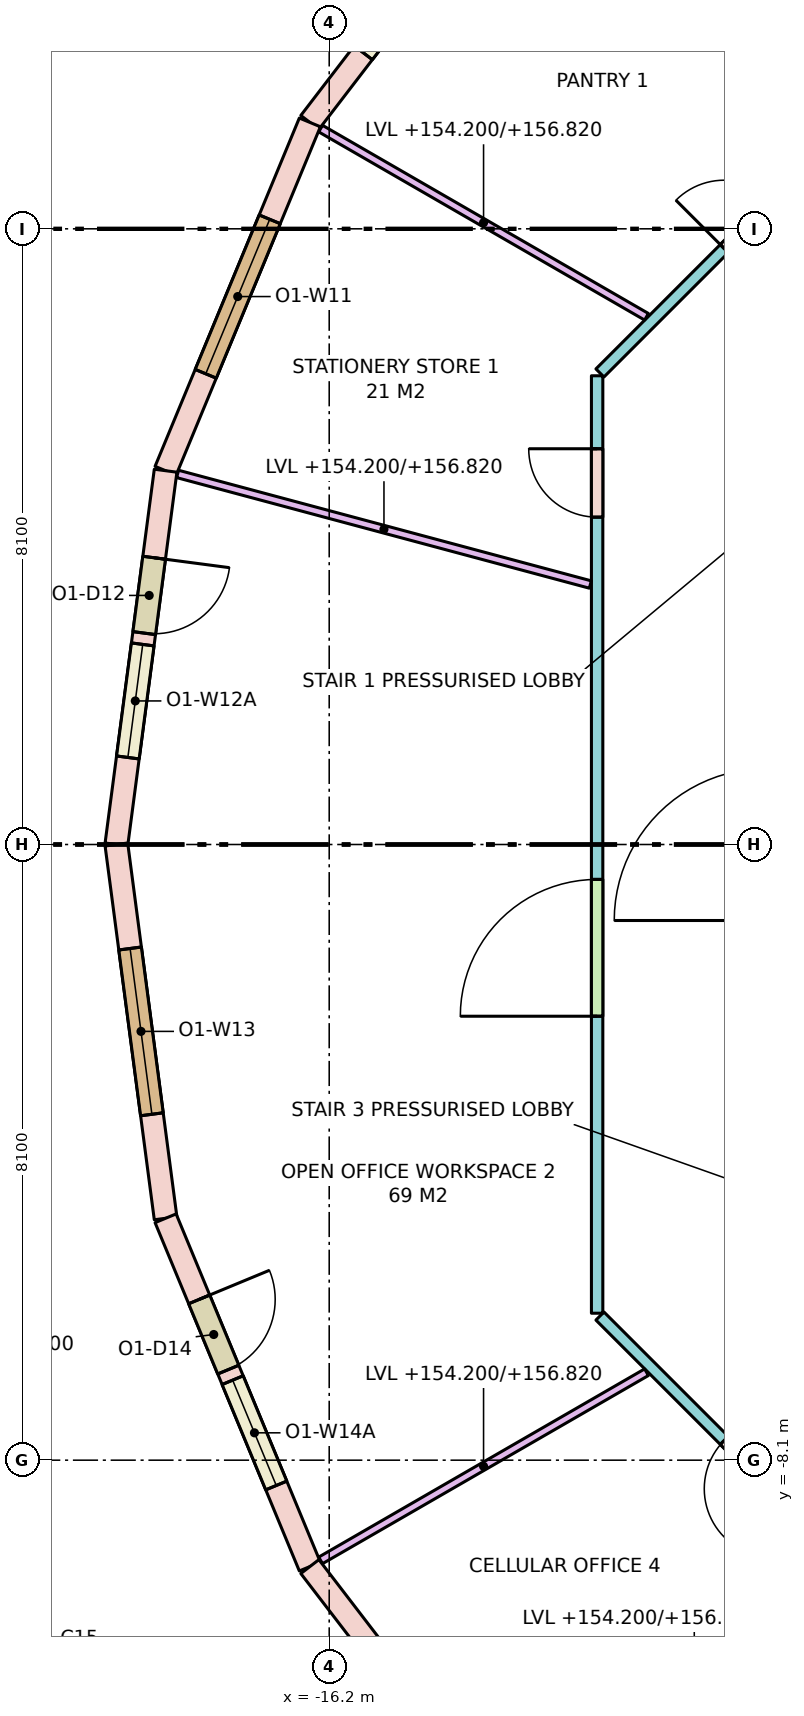
"""IFC4 building model, lengths in metres.
Left out: names, types, materials, properties, quantities, classifications, styles, units other than length and angle.
Written with IfcOpenShell. Run it as: python <this file> out.ifc"""

import sys

from ifc_helpers import new_model, si_unit, direction, frame, frame_2d, origin, place, context, subcontext, project, spatial, rectangle, extrude, element, fill, save


model = new_model("IFC4")
c1 = context("Model", 3, precision=1e-05, world=origin(), true_north=direction((0.0, 1.0)))
c2 = subcontext(c1, "Body", "Model", "MODEL_VIEW")
j1 = project(units=[si_unit("LENGTHUNIT", "METRE"), si_unit("PLANEANGLEUNIT", "RADIAN")], contexts=[c1])
p1 = place(None, origin())
s1 = spatial("IfcSite", under=j1, at=p1, CompositionType="ELEMENT")
p2 = place(p1, origin())
s2 = spatial("IfcBuilding", under=s1, at=p2, CompositionType="ELEMENT")
p3 = place(p2, frame((0.0, 0.0, 154.2)))
s3 = spatial("IfcBuildingStorey", under=s2, at=p3, CompositionType="ELEMENT", Elevation=154.2)
p4 = place(p3, frame((-13.435, 13.435, 0.0), z_axis=(0.0, 0.0, 1.0), x_axis=(-0.608768356425, -0.793348024649, 0.0)))
e1 = element("IfcWall", 1, at=p4, inside=s3, PredefinedType="STANDARD", context=c2, shape_type="SweptSolid", body=[
    extrude(rectangle(XDim=4.96, YDim=0.3, at=frame_2d((2.48, 0.0))), origin(), (0.0, 0.0, 1.0), 3.42),
])
p5 = place(p4, frame((1.155, 0.0, 0.0)))
e2 = element("IfcOpeningElement", 2, at=p5, cuts=e1, PredefinedType="OPENING", context=c2, shape_type="SweptSolid", body=[
    extrude(rectangle(XDim=1.0, YDim=2.4, at=frame_2d((0.5, 1.2))), frame((0.0, 0.16, 0.0), z_axis=(0.0, -1.0, 0.0), x_axis=(1.0, 0.0, 0.0)), (0.0, 0.0, 1.0), 0.32),
])
p6 = place(p4, frame((2.305, 0.0, 0.8)))
e3 = element("IfcOpeningElement", 3, at=p6, cuts=e1, PredefinedType="OPENING", context=c2, shape_type="SweptSolid", body=[
    extrude(rectangle(XDim=1.5, YDim=2.4, at=frame_2d((0.75, 1.2))), frame((0.0, 0.16, 0.0), z_axis=(0.0, -1.0, 0.0), x_axis=(1.0, 0.0, 0.0)), (0.0, 0.0, 1.0), 0.32),
])
p7 = place(p3, frame((-16.455, 9.5, 0.0), z_axis=(0.0, 0.0, 1.0), x_axis=(-0.382650301762, -0.923893254961, 0.0)))
e4 = element("IfcWall", 4, at=p7, inside=s3, PredefinedType="STANDARD", context=c2, shape_type="SweptSolid", body=[
    extrude(rectangle(XDim=4.96, YDim=0.3, at=frame_2d((2.48, 0.0))), origin(), (0.0, 0.0, 1.0), 3.42),
])
p8 = place(p7, frame((1.38, 0.0, 0.8)))
e5 = element("IfcOpeningElement", 5, at=p8, cuts=e4, PredefinedType="OPENING", context=c2, shape_type="SweptSolid", body=[
    extrude(rectangle(XDim=2.2, YDim=2.4, at=frame_2d((1.1, 1.2))), frame((0.0, 0.16, 0.0), z_axis=(0.0, -1.0, 0.0), x_axis=(1.0, 0.0, 0.0)), (0.0, 0.0, 1.0), 0.32),
])
p9 = place(p3, frame((-18.353, 4.917, 0.0), z_axis=(0.0, 0.0, 1.0), x_axis=(-0.130538549191, -0.991443234469, 0.0)))
e6 = element("IfcWall", 6, at=p9, inside=s3, PredefinedType="STANDARD", context=c2, shape_type="SweptSolid", body=[
    extrude(rectangle(XDim=4.96, YDim=0.3, at=frame_2d((2.48, 0.0))), origin(), (0.0, 0.0, 1.0), 3.42),
])
p10 = place(p9, frame((1.155, 0.0, 0.0)))
e7 = element("IfcOpeningElement", 7, at=p10, cuts=e6, PredefinedType="OPENING", context=c2, shape_type="SweptSolid", body=[
    extrude(rectangle(XDim=1.0, YDim=2.4, at=frame_2d((0.5, 1.2))), frame((0.0, 0.16, 0.0), z_axis=(0.0, -1.0, 0.0), x_axis=(1.0, 0.0, 0.0)), (0.0, 0.0, 1.0), 0.32),
])
p11 = place(p9, frame((2.305, 0.0, 0.8)))
e8 = element("IfcOpeningElement", 8, at=p11, cuts=e6, PredefinedType="OPENING", context=c2, shape_type="SweptSolid", body=[
    extrude(rectangle(XDim=1.5, YDim=2.4, at=frame_2d((0.75, 1.2))), frame((0.0, 0.16, 0.0), z_axis=(0.0, -1.0, 0.0), x_axis=(1.0, 0.0, 0.0)), (0.0, 0.0, 1.0), 0.32),
])
p12 = place(p3, frame((-19.0, 0.0, 0.0), z_axis=(0.0, 0.0, 1.0), x_axis=(0.130538549191, -0.991443234469, 0.0)))
e9 = element("IfcWall", 9, at=p12, inside=s3, PredefinedType="STANDARD", context=c2, shape_type="SweptSolid", body=[
    extrude(rectangle(XDim=4.96, YDim=0.3, at=frame_2d((2.48, 0.0))), origin(), (0.0, 0.0, 1.0), 3.42),
])
p13 = place(p12, frame((1.38, 0.0, 0.8)))
e10 = element("IfcOpeningElement", 10, at=p13, cuts=e9, PredefinedType="OPENING", context=c2, shape_type="SweptSolid", body=[
    extrude(rectangle(XDim=2.2, YDim=2.4, at=frame_2d((1.1, 1.2))), frame((0.0, 0.16, 0.0), z_axis=(0.0, -1.0, 0.0), x_axis=(1.0, 0.0, 0.0)), (0.0, 0.0, 1.0), 0.32),
])
p14 = place(p3, frame((-18.353, -4.917, 0.0), z_axis=(0.0, 0.0, 1.0), x_axis=(0.382650301762, -0.923893254961, 0.0)))
e11 = element("IfcWall", 11, at=p14, inside=s3, PredefinedType="STANDARD", context=c2, shape_type="SweptSolid", body=[
    extrude(rectangle(XDim=4.96, YDim=0.3, at=frame_2d((2.48, 0.0))), origin(), (0.0, 0.0, 1.0), 3.42),
])
p15 = place(p14, frame((1.155, 0.0, 0.0)))
e12 = element("IfcOpeningElement", 12, at=p15, cuts=e11, PredefinedType="OPENING", context=c2, shape_type="SweptSolid", body=[
    extrude(rectangle(XDim=1.0, YDim=2.4, at=frame_2d((0.5, 1.2))), frame((0.0, 0.16, 0.0), z_axis=(0.0, -1.0, 0.0), x_axis=(1.0, 0.0, 0.0)), (0.0, 0.0, 1.0), 0.32),
])
p16 = place(p14, frame((2.305, 0.0, 0.8)))
e13 = element("IfcOpeningElement", 13, at=p16, cuts=e11, PredefinedType="OPENING", context=c2, shape_type="SweptSolid", body=[
    extrude(rectangle(XDim=1.5, YDim=2.4, at=frame_2d((0.75, 1.2))), frame((0.0, 0.16, 0.0), z_axis=(0.0, -1.0, 0.0), x_axis=(1.0, 0.0, 0.0)), (0.0, 0.0, 1.0), 0.32),
])
p17 = place(p3, frame((-16.455, -9.5, 0.0), z_axis=(0.0, 0.0, 1.0), x_axis=(0.608768356425, -0.793348024649, 0.0)))
e14 = element("IfcWall", 14, at=p17, inside=s3, PredefinedType="STANDARD", context=c2, shape_type="SweptSolid", body=[
    extrude(rectangle(XDim=4.96, YDim=0.3, at=frame_2d((2.48, 0.0))), origin(), (0.0, 0.0, 1.0), 3.42),
])
p18 = place(p17, frame((1.38, 0.0, 0.8)))
e15 = element("IfcOpeningElement", 15, at=p18, cuts=e14, PredefinedType="OPENING", context=c2, shape_type="SweptSolid", body=[
    extrude(rectangle(XDim=2.2, YDim=2.4, at=frame_2d((1.1, 1.2))), frame((0.0, 0.16, 0.0), z_axis=(0.0, -1.0, 0.0), x_axis=(1.0, 0.0, 0.0)), (0.0, 0.0, 1.0), 0.32),
])
p19 = place(p3, frame((-8.167, -10.675, 0.0), z_axis=(0.0, 0.0, 1.0), x_axis=(-0.707106781187, 0.707106781187, 0.0)))
e16 = element("IfcWall", 16, at=p19, inside=s3, PredefinedType="PARTITIONING", context=c2, shape_type="SweptSolid", body=[
    extrude(rectangle(XDim=6.323, YDim=0.15, at=frame_2d((3.162, 0.0))), origin(), (0.0, 0.0, 1.0), 2.62),
])
p20 = place(p19, frame((3.11, 0.0, 0.0)))
e17 = element("IfcOpeningElement", 17, at=p20, cuts=e16, PredefinedType="OPENING", context=c2, shape_type="SweptSolid", body=[
    extrude(rectangle(XDim=0.9, YDim=2.1, at=frame_2d((0.45, 1.05))), frame((0.0, 0.085, 0.0), z_axis=(0.0, -1.0, 0.0), x_axis=(1.0, 0.0, 0.0)), (0.0, 0.0, 1.0), 0.17),
])
p21 = place(p19, frame((0.462, 0.0, 0.0)))
e18 = element("IfcOpeningElement", 18, at=p21, cuts=e16, PredefinedType="OPENING", context=c2, shape_type="SweptSolid", body=[
    extrude(rectangle(XDim=0.9, YDim=2.1, at=frame_2d((0.45, 1.05))), frame((0.0, 0.085, 0.0), z_axis=(0.0, -1.0, 0.0), x_axis=(1.0, 0.0, 0.0)), (0.0, 0.0, 1.0), 0.17),
])
p22 = place(p3, frame((-12.675, -6.167, 0.0), z_axis=(0.0, 0.0, 1.0), x_axis=(0.0, 1.0, 0.0)))
e19 = element("IfcWall", 19, at=p22, inside=s3, PredefinedType="PARTITIONING", context=c2, shape_type="SweptSolid", body=[
    extrude(rectangle(XDim=12.333, YDim=0.15, at=frame_2d((6.167, 0.0))), origin(), (0.0, 0.0, 1.0), 2.62),
])
p23 = place(p22, frame((10.473, 0.0, 0.0)))
e20 = element("IfcOpeningElement", 20, at=p23, cuts=e19, PredefinedType="OPENING", context=c2, shape_type="SweptSolid", body=[
    extrude(rectangle(XDim=0.9, YDim=2.1, at=frame_2d((0.45, 1.05))), frame((0.0, 0.085, 0.0), z_axis=(0.0, -1.0, 0.0), x_axis=(1.0, 0.0, 0.0)), (0.0, 0.0, 1.0), 0.17),
])
p24 = place(p22, frame((3.907, 0.0, 0.0)))
e21 = element("IfcOpeningElement", 21, at=p24, cuts=e19, PredefinedType="OPENING", context=c2, shape_type="SweptSolid", body=[
    extrude(rectangle(XDim=1.8, YDim=2.1, at=frame_2d((0.9, 1.05))), frame((0.0, 0.085, 0.0), z_axis=(0.0, -1.0, 0.0), x_axis=(1.0, 0.0, 0.0)), (0.0, 0.0, 1.0), 0.17),
])
p25 = place(p3, frame((-12.638, 6.204, 0.0), z_axis=(0.0, 0.0, 1.0), x_axis=(0.707106781187, 0.707106781187, 0.0)))
e22 = element("IfcWall", 22, at=p25, inside=s3, PredefinedType="PARTITIONING", context=c2, shape_type="SweptSolid", body=[
    extrude(rectangle(XDim=6.271, YDim=0.15, at=frame_2d((3.135, 0.0))), origin(), (0.0, 0.0, 1.0), 2.62),
])
p26 = place(p25, frame((2.314, 0.0, 0.0)))
e23 = element("IfcOpeningElement", 23, at=p26, cuts=e22, PredefinedType="OPENING", context=c2, shape_type="SweptSolid", body=[
    extrude(rectangle(XDim=0.9, YDim=2.1, at=frame_2d((0.45, 1.05))), frame((0.0, 0.085, 0.0), z_axis=(0.0, -1.0, 0.0), x_axis=(1.0, 0.0, 0.0)), (0.0, 0.0, 1.0), 0.17),
])
p27 = place(p3, frame((-9.474, 9.474, 0.0), z_axis=(0.0, 0.0, 1.0), x_axis=(-0.707106781187, 0.707106781187, 0.0)))
e24 = element("IfcWall", 24, at=p27, inside=s3, PredefinedType="PARTITIONING", context=c2, shape_type="SweptSolid", body=[
    extrude(rectangle(XDim=5.439, YDim=0.1, at=frame_2d((2.719, 0.0))), origin(), (0.0, 0.0, 1.0), 2.62),
])
p28 = place(p3, frame((-12.025, 6.943, 0.0), z_axis=(0.0, 0.0, 1.0), x_axis=(-0.866025463095, 0.499999897272, 0.0)))
e25 = element("IfcWall", 25, at=p28, inside=s3, PredefinedType="PARTITIONING", context=c2, shape_type="SweptSolid", body=[
    extrude(rectangle(XDim=4.951, YDim=0.1, at=frame_2d((2.476, 0.0))), origin(), (0.0, 0.0, 1.0), 2.62),
])
p29 = place(p3, frame((-12.764, 3.42, 0.0), z_axis=(0.0, 0.0, 1.0), x_axis=(-0.965925759926, 0.258819292773, 0.0)))
e26 = element("IfcWall", 26, at=p29, inside=s3, PredefinedType="PARTITIONING", context=c2, shape_type="SweptSolid", body=[
    extrude(rectangle(XDim=5.622, YDim=0.1, at=frame_2d((2.811, 0.0))), origin(), (0.0, 0.0, 1.0), 2.62),
])
p30 = place(p3, frame((-12.025, -6.943, 0.0), z_axis=(0.0, 0.0, 1.0), x_axis=(-0.866025463095, -0.499999897272, 0.0)))
e27 = element("IfcWall", 27, at=p30, inside=s3, PredefinedType="PARTITIONING", context=c2, shape_type="SweptSolid", body=[
    extrude(rectangle(XDim=4.951, YDim=0.1, at=frame_2d((2.476, 0.0))), origin(), (0.0, 0.0, 1.0), 2.62),
])
p31 = place(p3, frame((-9.474, -9.474, 0.0), z_axis=(0.0, 0.0, 1.0), x_axis=(-0.707106781187, -0.707106781187, 0.0)))
e28 = element("IfcWall", 28, at=p31, inside=s3, PredefinedType="PARTITIONING", context=c2, shape_type="SweptSolid", body=[
    extrude(rectangle(XDim=5.439, YDim=0.1, at=frame_2d((2.719, 0.0))), origin(), (0.0, 0.0, 1.0), 2.62),
])
p32 = place(p6, origin())
e29 = element("IfcWindow", 29, at=p32, inside=s3, PartitioningType="SINGLE_PANEL", PredefinedType="WINDOW", context=c2, shape_type="SweptSolid", body=[
    extrude(rectangle(XDim=1.5, YDim=2.4, at=frame_2d((0.75, 1.2))), frame((0.0, 0.03, 0.0), z_axis=(0.0, -1.0, 0.0), x_axis=(1.0, 0.0, 0.0)), (0.0, 0.0, 1.0), 0.06),
])
fill(e3, e29)
p33 = place(p8, origin())
e30 = element("IfcWindow", 30, at=p33, inside=s3, PartitioningType="SINGLE_PANEL", PredefinedType="WINDOW", context=c2, shape_type="SweptSolid", body=[
    extrude(rectangle(XDim=2.2, YDim=2.4, at=frame_2d((1.1, 1.2))), frame((0.0, 0.03, 0.0), z_axis=(0.0, -1.0, 0.0), x_axis=(1.0, 0.0, 0.0)), (0.0, 0.0, 1.0), 0.06),
])
fill(e5, e30)
p34 = place(p10, origin())
e31 = element("IfcDoor", 31, at=p34, inside=s3, OperationType="SINGLE_SWING_LEFT", PredefinedType="DOOR", context=c2, shape_type="SweptSolid", body=[
    extrude(rectangle(XDim=1.0, YDim=2.4, at=frame_2d((0.5, 1.2))), frame((0.0, 0.025, 0.0), z_axis=(0.0, -1.0, 0.0), x_axis=(1.0, 0.0, 0.0)), (0.0, 0.0, 1.0), 0.05),
])
fill(e7, e31)
p35 = place(p11, origin())
e32 = element("IfcWindow", 32, at=p35, inside=s3, PartitioningType="SINGLE_PANEL", PredefinedType="WINDOW", context=c2, shape_type="SweptSolid", body=[
    extrude(rectangle(XDim=1.5, YDim=2.4, at=frame_2d((0.75, 1.2))), frame((0.0, 0.03, 0.0), z_axis=(0.0, -1.0, 0.0), x_axis=(1.0, 0.0, 0.0)), (0.0, 0.0, 1.0), 0.06),
])
fill(e8, e32)
p36 = place(p13, origin())
e33 = element("IfcWindow", 33, at=p36, inside=s3, PartitioningType="SINGLE_PANEL", PredefinedType="WINDOW", context=c2, shape_type="SweptSolid", body=[
    extrude(rectangle(XDim=2.2, YDim=2.4, at=frame_2d((1.1, 1.2))), frame((0.0, 0.03, 0.0), z_axis=(0.0, -1.0, 0.0), x_axis=(1.0, 0.0, 0.0)), (0.0, 0.0, 1.0), 0.06),
])
fill(e10, e33)
p37 = place(p15, origin())
e34 = element("IfcDoor", 34, at=p37, inside=s3, OperationType="SINGLE_SWING_LEFT", PredefinedType="DOOR", context=c2, shape_type="SweptSolid", body=[
    extrude(rectangle(XDim=1.0, YDim=2.4, at=frame_2d((0.5, 1.2))), frame((0.0, 0.025, 0.0), z_axis=(0.0, -1.0, 0.0), x_axis=(1.0, 0.0, 0.0)), (0.0, 0.0, 1.0), 0.05),
])
fill(e12, e34)
p38 = place(p16, origin())
e35 = element("IfcWindow", 35, at=p38, inside=s3, PartitioningType="SINGLE_PANEL", PredefinedType="WINDOW", context=c2, shape_type="SweptSolid", body=[
    extrude(rectangle(XDim=1.5, YDim=2.4, at=frame_2d((0.75, 1.2))), frame((0.0, 0.03, 0.0), z_axis=(0.0, -1.0, 0.0), x_axis=(1.0, 0.0, 0.0)), (0.0, 0.0, 1.0), 0.06),
])
fill(e13, e35)
p39 = place(p26, origin())
e36 = element("IfcDoor", 36, at=p39, inside=s3, OperationType="SINGLE_SWING_LEFT", PredefinedType="DOOR", context=c2, shape_type="SweptSolid", body=[
    extrude(rectangle(XDim=0.9, YDim=2.1, at=frame_2d((0.45, 1.05))), frame((0.0, 0.025, 0.0), z_axis=(0.0, -1.0, 0.0), x_axis=(1.0, 0.0, 0.0)), (0.0, 0.0, 1.0), 0.05),
])
fill(e23, e36)
p40 = place(p23, origin())
e37 = element("IfcDoor", 37, at=p40, inside=s3, OperationType="SINGLE_SWING_RIGHT", PredefinedType="DOOR", context=c2, shape_type="SweptSolid", body=[
    extrude(rectangle(XDim=0.9, YDim=2.1, at=frame_2d((0.45, 1.05))), frame((0.0, 0.025, 0.0), z_axis=(0.0, -1.0, 0.0), x_axis=(1.0, 0.0, 0.0)), (0.0, 0.0, 1.0), 0.05),
])
fill(e20, e37)
p41 = place(p24, origin())
e38 = element("IfcDoor", 38, at=p41, inside=s3, OperationType="DOUBLE_DOOR_SINGLE_SWING", PredefinedType="DOOR", context=c2, shape_type="SweptSolid", body=[
    extrude(rectangle(XDim=1.8, YDim=2.1, at=frame_2d((0.9, 1.05))), frame((0.0, 0.025, 0.0), z_axis=(0.0, -1.0, 0.0), x_axis=(1.0, 0.0, 0.0)), (0.0, 0.0, 1.0), 0.05),
])
fill(e21, e38)
p42 = place(p20, origin())
e39 = element("IfcDoor", 39, at=p42, inside=s3, OperationType="SINGLE_SWING_LEFT", PredefinedType="DOOR", context=c2, shape_type="SweptSolid", body=[
    extrude(rectangle(XDim=0.9, YDim=2.1, at=frame_2d((0.45, 1.05))), frame((0.0, 0.025, 0.0), z_axis=(0.0, -1.0, 0.0), x_axis=(1.0, 0.0, 0.0)), (0.0, 0.0, 1.0), 0.05),
])
fill(e17, e39)
save(model, sys.argv[1])
